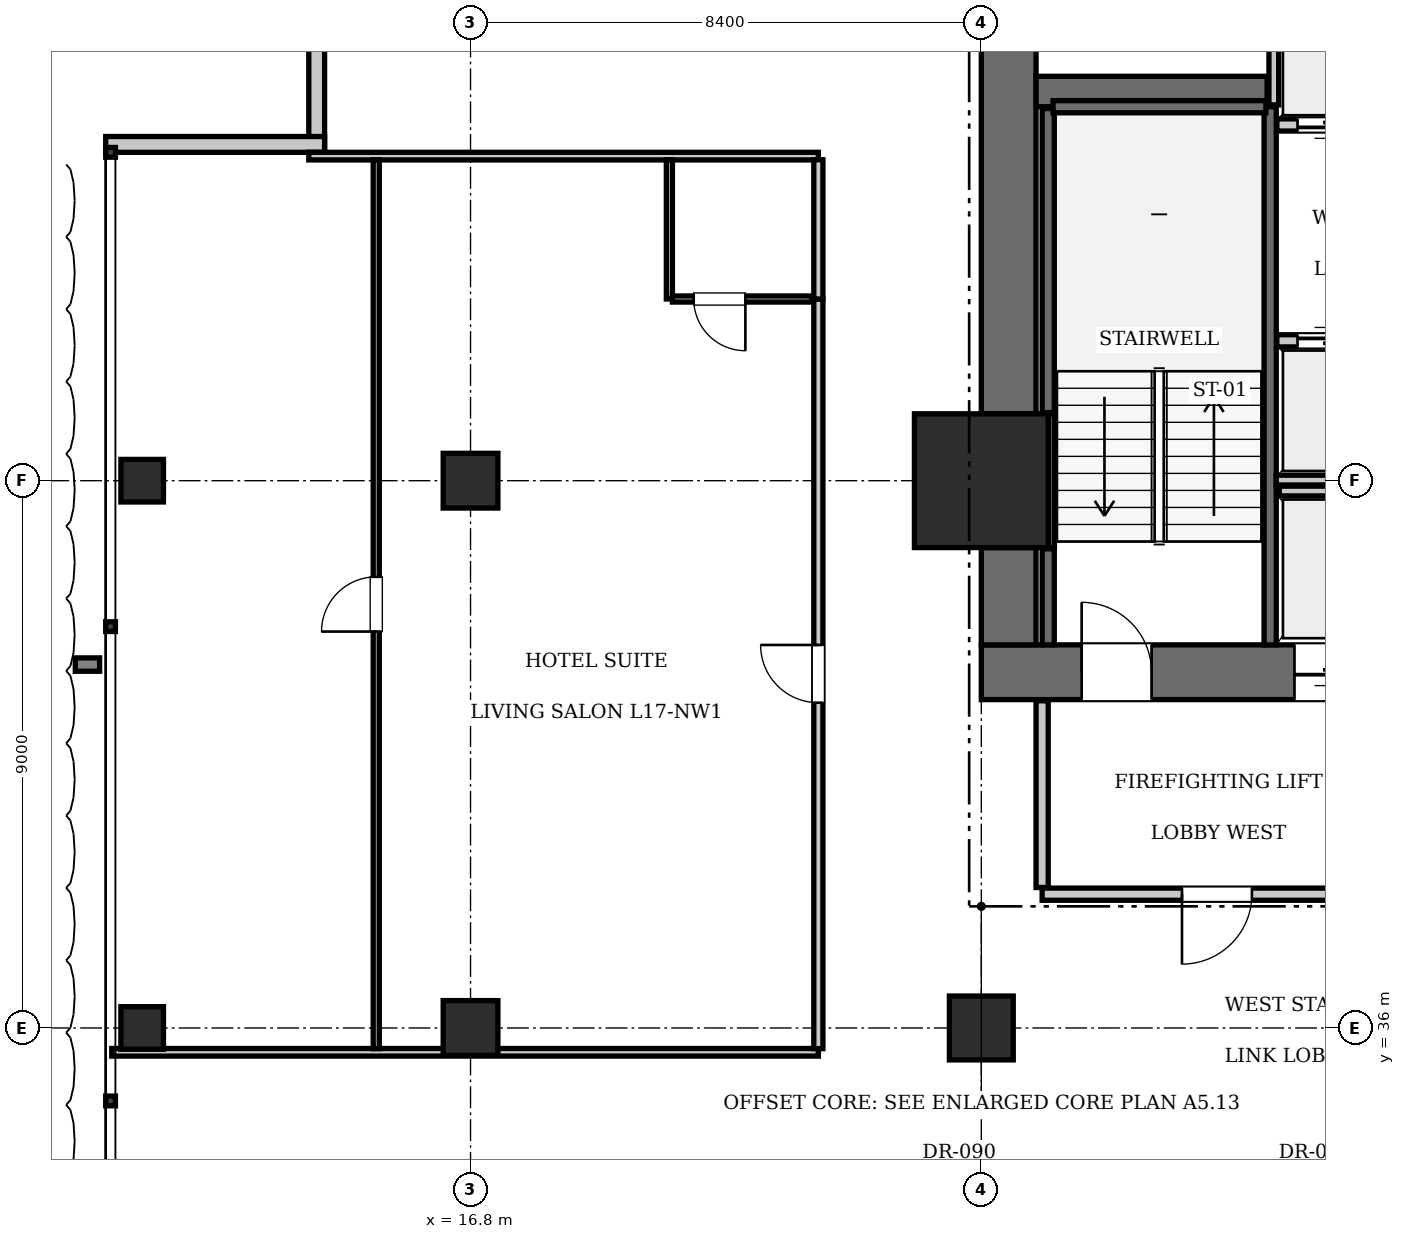
"""IFC4 building model, lengths in metres.
Left out: names, types, materials, properties, quantities, classifications, styles, units other than length and angle.
Written with IfcOpenShell. Run it as: python <this file> out.ifc"""

import sys

from ifc_helpers import new_model, si_unit, direction, frame, frame_2d, origin, origin_2d, place, context, subcontext, project, spatial, rectangle, i_section, extrude, element, fill, save


model = new_model("IFC4")
c1 = context("Model", 3, precision=1e-05, world=origin(), true_north=direction((0.0, 1.0)))
c2 = subcontext(c1, "Body", "Model", "MODEL_VIEW")
j1 = project(units=[si_unit("LENGTHUNIT", "METRE"), si_unit("PLANEANGLEUNIT", "RADIAN")], contexts=[c1])
p1 = place(None, origin())
s1 = spatial("IfcSite", under=j1, at=p1, CompositionType="ELEMENT")
p2 = place(p1, origin())
s2 = spatial("IfcBuilding", under=s1, at=p2, CompositionType="ELEMENT")
p3 = place(p2, frame((0.0, 0.0, 73.15)))
s3 = spatial("IfcBuildingStorey", under=s2, at=p3, CompositionType="ELEMENT", Elevation=73.15)
p4 = place(p3, frame((25.2, 45.0, 0.0), z_axis=(0.0, 0.0, 1.0), x_axis=(1.0, 0.0, 0.0)))
e1 = element("IfcColumn", 1, at=p4, inside=s3, PredefinedType="COLUMN", context=c2, shape_type="SweptSolid", body=[
    extrude(rectangle(XDim=2.2, YDim=2.2, at=origin_2d()), origin(), (0.0, 0.0, 1.0), 3.85),
])
p5 = place(p3, frame((25.2, 41.85, 0.0), z_axis=(0.0, 0.0, 1.0), x_axis=(1.0, 0.0, 0.0)))
e2 = element("IfcWall", 2, at=p5, inside=s3, PredefinedType="SHEAR", context=c2, shape_type="SweptSolid", body=[
    extrude(rectangle(XDim=6.8, YDim=0.9, at=frame_2d((3.4, 0.0))), origin(), (0.0, 0.0, 1.0), 3.85),
])
p6 = place(p5, frame((1.65, 0.0, 0.0)))
e3 = element("IfcOpeningElement", 3, at=p6, cuts=e2, PredefinedType="OPENING", context=c2, shape_type="SweptSolid", body=[
    extrude(rectangle(XDim=1.15, YDim=2.15, at=frame_2d((0.575, 1.075))), frame((0.0, 0.46, 0.0), z_axis=(0.0, -1.0, 0.0), x_axis=(1.0, 0.0, 0.0)), (0.0, 0.0, 1.0), 0.92),
])
p7 = place(p5, frame((5.15, 0.0, 0.0)))
e4 = element("IfcOpeningElement", 4, at=p7, cuts=e2, PredefinedType="OPENING", context=c2, shape_type="SweptSolid", body=[
    extrude(rectangle(XDim=1.1, YDim=2.2, at=frame_2d((0.55, 1.1))), frame((0.0, 0.46, 0.0), z_axis=(0.0, -1.0, 0.0), x_axis=(1.0, 0.0, 0.0)), (0.0, 0.0, 1.0), 0.92),
])
p8 = place(p3, frame((25.65, 42.3, 0.0), z_axis=(0.0, 0.0, 1.0), x_axis=(0.0, 1.0, 0.0)))
e5 = element("IfcWall", 5, at=p8, inside=s3, PredefinedType="SHEAR", context=c2, shape_type="SweptSolid", body=[
    extrude(rectangle(XDim=1.6, YDim=0.9, at=frame_2d((0.8, 0.0))), origin(), (0.0, 0.0, 1.0), 3.85),
])
p9 = place(p3, frame((25.65, 46.1, 0.0), z_axis=(0.0, 0.0, 1.0), x_axis=(0.0, 1.0, 0.0)))
e6 = element("IfcWall", 6, at=p9, inside=s3, PredefinedType="SHEAR", context=c2, shape_type="SweptSolid", body=[
    extrude(rectangle(XDim=7.0, YDim=0.9, at=frame_2d((3.5, 0.0))), origin(), (0.0, 0.0, 1.0), 3.85),
])
p10 = place(p3, frame((26.1, 51.4, 0.0), z_axis=(0.0, 0.0, 1.0), x_axis=(1.0, 0.0, 0.0)))
e7 = element("IfcWall", 7, at=p10, inside=s3, PredefinedType="SHEAR", context=c2, shape_type="SweptSolid", body=[
    extrude(rectangle(XDim=3.8, YDim=0.5, at=frame_2d((1.9, 0.0))), origin(), (0.0, 0.0, 1.0), 3.85),
])
p11 = place(p3, frame((25.2, 36.0, 0.0), z_axis=(0.0, 0.0, 1.0), x_axis=(1.0, 0.0, 0.0)))
e8 = element("IfcColumn", 8, at=p11, inside=s3, PredefinedType="COLUMN", context=c2, shape_type="SweptSolid", body=[
    extrude(rectangle(XDim=1.05, YDim=1.05, at=origin_2d()), origin(), (0.0, 0.0, 1.0), 3.85),
])
for number, where, z_axis, x_axis in (
    (9, (16.8, 36.0, 0.0), (0.0, 0.0, 1.0), (1.0, 0.0, 0.0)),
    (10, (16.8, 45.0, 0.0), (0.0, 0.0, 1.0), (1.0, 0.0, 0.0)),
):
    element("IfcColumn", number, at=place(p3, frame(where, z_axis=z_axis, x_axis=x_axis)), inside=s3, PredefinedType="COLUMN", context=c2, shape_type="SweptSolid", body=[
        extrude(rectangle(XDim=0.9, YDim=0.9, at=origin_2d()), origin(), (0.0, 0.0, 1.0), 3.85),
    ])
for number, where, z_axis, x_axis in (
    (11, (11.4, 36.0, 0.0), (0.0, 0.0, 1.0), (1.0, 0.0, 0.0)),
    (12, (11.4, 45.0, 0.0), (0.0, 0.0, 1.0), (1.0, 0.0, 0.0)),
):
    element("IfcColumn", number, at=place(p3, frame(where, z_axis=z_axis, x_axis=x_axis)), inside=s3, PredefinedType="COLUMN", context=c2, shape_type="SweptSolid", body=[
        extrude(i_section(OverallWidth=0.7, OverallDepth=0.7, WebThickness=0.028, FlangeThickness=0.044, at=origin_2d()), origin(), (0.0, 0.0, 1.0), 3.85),
    ])
p12 = place(p3, frame((29.95, 42.3, 0.0), z_axis=(0.0, 0.0, 1.0), x_axis=(0.0, 1.0, 0.0)))
e13 = element("IfcWall", 13, at=p12, inside=s3, PredefinedType="SOLIDWALL", context=c2, shape_type="SweptSolid", body=[
    extrude(rectangle(XDim=8.85, YDim=0.2, at=frame_2d((4.425, 0.0))), origin(), (0.0, 0.0, 1.0), 3.61),
])
p13 = place(p3, frame((26.3, 42.3, 0.0), z_axis=(0.0, 0.0, 1.0), x_axis=(0.0, 1.0, 0.0)))
e14 = element("IfcWall", 14, at=p13, inside=s3, PredefinedType="SOLIDWALL", context=c2, shape_type="SweptSolid", body=[
    extrude(rectangle(XDim=1.58, YDim=0.2, at=frame_2d((0.79, 0.0))), origin(), (0.0, 0.0, 1.0), 3.61),
])
p14 = place(p3, frame((26.3, 46.12, 0.0), z_axis=(0.0, 0.0, 1.0), x_axis=(0.0, 1.0, 0.0)))
e15 = element("IfcWall", 15, at=p14, inside=s3, PredefinedType="SOLIDWALL", context=c2, shape_type="SweptSolid", body=[
    extrude(rectangle(XDim=5.0, YDim=0.2, at=frame_2d((2.5, 0.0))), origin(), (0.0, 0.0, 1.0), 3.61),
])
p15 = place(p3, frame((26.38, 51.15, 0.0), z_axis=(0.0, 0.0, 1.0), x_axis=(1.0, 0.0, 0.0)))
e16 = element("IfcWall", 16, at=p15, inside=s3, PredefinedType="SOLIDWALL", context=c2, shape_type="SweptSolid", body=[
    extrude(rectangle(XDim=3.5, YDim=0.2, at=frame_2d((1.75, 0.0))), origin(), (0.0, 0.0, 1.0), 3.61),
])
p16 = place(p3, frame((26.352, 43.9, 0.0), z_axis=(0.0, 0.0, 1.0), x_axis=(0.0, 1.0, 0.0)))
e17 = element("IfcWall", 17, at=p16, inside=s3, PredefinedType="SOLIDWALL", context=c2, shape_type="SweptSolid", body=[
    extrude(rectangle(XDim=2.2, YDim=0.1, at=frame_2d((1.1, 0.0))), origin(), (0.0, 0.0, 1.0), 3.61),
])
p17 = place(p3, frame((30.06, 47.3, 0.0), z_axis=(0.0, 0.0, 1.0), x_axis=(1.0, 0.0, 0.0)))
e18 = element("IfcWall", 18, at=p17, inside=s3, PredefinedType="SOLIDWALL", context=c2, shape_type="SweptSolid", body=[
    extrude(rectangle(XDim=1.68, YDim=0.2, at=frame_2d((0.84, 0.0))), origin(), (0.0, 0.0, 1.0), 3.61),
])
p18 = place(p17, frame((0.34, 0.0, 0.0)))
e19 = element("IfcOpeningElement", 19, at=p18, cuts=e18, PredefinedType="OPENING", context=c2, shape_type="SweptSolid", body=[
    extrude(rectangle(XDim=1.0, YDim=2.15, at=frame_2d((0.5, 1.075))), frame((0.0, 0.11, 0.0), z_axis=(0.0, -1.0, 0.0), x_axis=(1.0, 0.0, 0.0)), (0.0, 0.0, 1.0), 0.22),
])
p19 = place(p3, frame((30.06, 50.85, 0.0), z_axis=(0.0, 0.0, 1.0), x_axis=(1.0, 0.0, 0.0)))
e20 = element("IfcWall", 20, at=p19, inside=s3, PredefinedType="SOLIDWALL", context=c2, shape_type="SweptSolid", body=[
    extrude(rectangle(XDim=1.68, YDim=0.2, at=frame_2d((0.84, 0.0))), origin(), (0.0, 0.0, 1.0), 3.61),
])
p20 = place(p19, frame((0.34, 0.0, 0.0)))
e21 = element("IfcOpeningElement", 21, at=p20, cuts=e20, PredefinedType="OPENING", context=c2, shape_type="SweptSolid", body=[
    extrude(rectangle(XDim=1.0, YDim=2.15, at=frame_2d((0.5, 1.075))), frame((0.0, 0.11, 0.0), z_axis=(0.0, -1.0, 0.0), x_axis=(1.0, 0.0, 0.0)), (0.0, 0.0, 1.0), 0.22),
])
p21 = place(p3, frame((30.1, 44.83, 0.0), z_axis=(0.0, 0.0, 1.0), x_axis=(1.0, 0.0, 0.0)))
e22 = element("IfcWall", 22, at=p21, inside=s3, PredefinedType="SOLIDWALL", context=c2, shape_type="SweptSolid", body=[
    extrude(rectangle(XDim=1.6, YDim=0.16, at=frame_2d((0.8, 0.0))), origin(), (0.0, 0.0, 1.0), 3.61),
])
p22 = place(p3, frame((30.05, 45.01, 0.0), z_axis=(0.0, 0.0, 1.0), x_axis=(1.0, 0.0, 0.0)))
e23 = element("IfcWall", 23, at=p22, inside=s3, PredefinedType="SOLIDWALL", context=c2, shape_type="SweptSolid", body=[
    extrude(rectangle(XDim=3.45, YDim=0.16, at=frame_2d((1.725, 0.0))), origin(), (0.0, 0.0, 1.0), 3.61),
])
p23 = place(p3, frame((30.01, 51.18, 0.0), z_axis=(0.0, 0.0, 1.0), x_axis=(0.0, 1.0, 0.0)))
e24 = element("IfcWall", 24, at=p23, inside=s3, PredefinedType="SOLIDWALL", context=c2, shape_type="SweptSolid", body=[
    extrude(rectangle(XDim=1.92, YDim=0.16, at=frame_2d((0.96, 0.0))), origin(), (0.0, 0.0, 1.0), 3.61),
])
p24 = place(p3, frame((14.27, 50.4, 0.0), z_axis=(0.0, 0.0, 1.0), x_axis=(0.0, 1.0, 0.0)))
e25 = element("IfcWall", 25, at=p24, inside=s3, PredefinedType="SOLIDWALL", context=c2, shape_type="SweptSolid", body=[
    extrude(rectangle(XDim=3.6, YDim=0.26, at=frame_2d((1.8, 0.0))), origin(), (0.0, 0.0, 1.0), 3.61),
])
p25 = place(p3, frame((10.8, 50.53, 0.0), z_axis=(0.0, 0.0, 1.0), x_axis=(1.0, 0.0, 0.0)))
e26 = element("IfcWall", 26, at=p25, inside=s3, PredefinedType="SOLIDWALL", context=c2, shape_type="SweptSolid", body=[
    extrude(rectangle(XDim=3.6, YDim=0.26, at=frame_2d((1.8, 0.0))), origin(), (0.0, 0.0, 1.0), 3.61),
])
p26 = place(p3, frame((26.2, 38.2, 0.0), z_axis=(0.0, 0.0, 1.0), x_axis=(1.0, 0.0, 0.0)))
e27 = element("IfcWall", 27, at=p26, inside=s3, PredefinedType="PARTITIONING", context=c2, shape_type="SweptSolid", body=[
    extrude(rectangle(XDim=5.8, YDim=0.2, at=frame_2d((2.9, 0.0))), origin(), (0.0, 0.0, 1.0), 3.61),
])
p27 = place(p26, frame((2.3, 0.0, 0.0)))
e28 = element("IfcOpeningElement", 28, at=p27, cuts=e27, PredefinedType="OPENING", context=c2, shape_type="SweptSolid", body=[
    extrude(rectangle(XDim=1.15, YDim=2.15, at=frame_2d((0.575, 1.075))), frame((0.0, 0.11, 0.0), z_axis=(0.0, -1.0, 0.0), x_axis=(1.0, 0.0, 0.0)), (0.0, 0.0, 1.0), 0.22),
])
p28 = place(p3, frame((26.2, 38.31, 0.0), z_axis=(0.0, 0.0, 1.0), x_axis=(0.0, 1.0, 0.0)))
e29 = element("IfcWall", 29, at=p28, inside=s3, PredefinedType="PARTITIONING", context=c2, shape_type="SweptSolid", body=[
    extrude(rectangle(XDim=3.07, YDim=0.2, at=frame_2d((1.535, 0.0))), origin(), (0.0, 0.0, 1.0), 3.61),
])
p29 = place(p3, frame((10.9, 35.6, 0.0), z_axis=(0.0, 0.0, 1.0), x_axis=(1.0, 0.0, 0.0)))
e30 = element("IfcWall", 30, at=p29, inside=s3, PredefinedType="PARTITIONING", context=c2, shape_type="SweptSolid", body=[
    extrude(rectangle(XDim=11.62, YDim=0.125, at=frame_2d((5.81, 0.0))), origin(), (0.0, 0.0, 1.0), 3.61),
])
p30 = place(p3, frame((14.14, 50.337, 0.0), z_axis=(0.0, 0.0, 1.0), x_axis=(1.0, 0.0, 0.0)))
e31 = element("IfcWall", 31, at=p30, inside=s3, PredefinedType="PARTITIONING", context=c2, shape_type="SweptSolid", body=[
    extrude(rectangle(XDim=8.38, YDim=0.125, at=frame_2d((4.19, 0.0))), origin(), (0.0, 0.0, 1.0), 3.61),
])
p31 = place(p3, frame((22.52, 35.66, 0.0), z_axis=(0.0, 0.0, 1.0), x_axis=(0.0, 1.0, 0.0)))
e32 = element("IfcWall", 32, at=p31, inside=s3, PredefinedType="PARTITIONING", context=c2, shape_type="SweptSolid", body=[
    extrude(rectangle(XDim=12.328, YDim=0.15, at=frame_2d((6.164, 0.0))), origin(), (0.0, 0.0, 1.0), 3.61),
])
p32 = place(p31, frame((5.689, 0.0, 0.0)))
e33 = element("IfcOpeningElement", 33, at=p32, cuts=e32, PredefinedType="OPENING", context=c2, shape_type="SweptSolid", body=[
    extrude(rectangle(XDim=0.95, YDim=2.15, at=frame_2d((0.475, 1.075))), frame((0.0, 0.085, 0.0), z_axis=(0.0, -1.0, 0.0), x_axis=(1.0, 0.0, 0.0)), (0.0, 0.0, 1.0), 0.17),
])
p33 = place(p3, frame((22.52, 47.988, 0.0), z_axis=(0.0, 0.0, 1.0), x_axis=(0.0, 1.0, 0.0)))
e34 = element("IfcWall", 34, at=p33, inside=s3, PredefinedType="PARTITIONING", context=c2, shape_type="SweptSolid", body=[
    extrude(rectangle(XDim=2.29, YDim=0.15, at=frame_2d((1.145, 0.0))), origin(), (0.0, 0.0, 1.0), 3.61),
])
p34 = place(p3, frame((20.07, 47.988, 0.0), z_axis=(0.0, 0.0, 1.0), x_axis=(0.0, 1.0, 0.0)))
e35 = element("IfcWall", 35, at=p34, inside=s3, PredefinedType="PARTITIONING", context=c2, shape_type="SweptSolid", body=[
    extrude(rectangle(XDim=2.29, YDim=0.1, at=frame_2d((1.145, 0.0))), origin(), (0.0, 0.0, 1.0), 3.61),
])
p35 = place(p3, frame((20.12, 47.988, 0.0), z_axis=(0.0, 0.0, 1.0), x_axis=(1.0, 0.0, 0.0)))
e36 = element("IfcWall", 36, at=p35, inside=s3, PredefinedType="PARTITIONING", context=c2, shape_type="SweptSolid", body=[
    extrude(rectangle(XDim=2.3, YDim=0.1, at=frame_2d((1.15, 0.0))), origin(), (0.0, 0.0, 1.0), 3.61),
])
p36 = place(p35, frame((0.35, 0.0, 0.0)))
e37 = element("IfcOpeningElement", 37, at=p36, cuts=e36, PredefinedType="OPENING", context=c2, shape_type="SweptSolid", body=[
    extrude(rectangle(XDim=0.85, YDim=2.1, at=frame_2d((0.425, 1.05))), frame((0.0, 0.06, 0.0), z_axis=(0.0, -1.0, 0.0), x_axis=(1.0, 0.0, 0.0)), (0.0, 0.0, 1.0), 0.12),
])
p37 = place(p3, frame((15.25, 35.66, 0.0), z_axis=(0.0, 0.0, 1.0), x_axis=(0.0, 1.0, 0.0)))
e38 = element("IfcWall", 38, at=p37, inside=s3, PredefinedType="PARTITIONING", context=c2, shape_type="SweptSolid", body=[
    extrude(rectangle(XDim=14.618, YDim=0.1, at=frame_2d((7.309, 0.0))), origin(), (0.0, 0.0, 1.0), 3.61),
])
p38 = place(p37, frame((6.859, 0.0, 0.0)))
e39 = element("IfcOpeningElement", 39, at=p38, cuts=e38, PredefinedType="OPENING", context=c2, shape_type="SweptSolid", body=[
    extrude(rectangle(XDim=0.9, YDim=2.1, at=frame_2d((0.45, 1.05))), frame((0.0, 0.06, 0.0), z_axis=(0.0, -1.0, 0.0), x_axis=(1.0, 0.0, 0.0)), (0.0, 0.0, 1.0), 0.12),
])
p39 = place(p6, origin())
e40 = element("IfcDoor", 40, at=p39, inside=s3, OperationType="SINGLE_SWING_LEFT", PredefinedType="DOOR", context=c2, shape_type="SweptSolid", body=[
    extrude(rectangle(XDim=1.15, YDim=2.15, at=frame_2d((0.575, 1.075))), frame((0.0, 0.025, 0.0), z_axis=(0.0, -1.0, 0.0), x_axis=(1.0, 0.0, 0.0)), (0.0, 0.0, 1.0), 0.05),
])
fill(e3, e40)
p40 = place(p18, origin())
e41 = element("IfcDoor", 41, at=p40, inside=s3, OperationType="SLIDING_TO_LEFT", PredefinedType="DOOR", context=c2, shape_type="SweptSolid", body=[
    extrude(rectangle(XDim=1.0, YDim=2.15, at=frame_2d((0.5, 1.075))), frame((0.0, 0.025, 0.0), z_axis=(0.0, -1.0, 0.0), x_axis=(1.0, 0.0, 0.0)), (0.0, 0.0, 1.0), 0.05),
])
fill(e19, e41)
p41 = place(p20, frame((1.0, 0.0, 0.0), z_axis=(0.0, 0.0, 1.0), x_axis=(-1.0, 0.0, 0.0)))
e42 = element("IfcDoor", 42, at=p41, inside=s3, OperationType="SLIDING_TO_LEFT", PredefinedType="DOOR", context=c2, shape_type="SweptSolid", body=[
    extrude(rectangle(XDim=1.0, YDim=2.15, at=frame_2d((0.5, 1.075))), frame((0.0, 0.025, 0.0), z_axis=(0.0, -1.0, 0.0), x_axis=(1.0, 0.0, 0.0)), (0.0, 0.0, 1.0), 0.05),
])
fill(e21, e42)
p42 = place(p7, frame((1.1, 0.0, 0.0), z_axis=(0.0, 0.0, 1.0), x_axis=(-1.0, 0.0, 0.0)))
e43 = element("IfcDoor", 43, at=p42, inside=s3, OperationType="SLIDING_TO_LEFT", PredefinedType="DOOR", context=c2, shape_type="SweptSolid", body=[
    extrude(rectangle(XDim=1.1, YDim=2.2, at=frame_2d((0.55, 1.1))), frame((0.0, 0.025, 0.0), z_axis=(0.0, -1.0, 0.0), x_axis=(1.0, 0.0, 0.0)), (0.0, 0.0, 1.0), 0.05),
])
fill(e4, e43)
p43 = place(p27, frame((1.15, 0.0, 0.0), z_axis=(0.0, 0.0, 1.0), x_axis=(-1.0, 0.0, 0.0)))
e44 = element("IfcDoor", 44, at=p43, inside=s3, OperationType="SINGLE_SWING_RIGHT", PredefinedType="DOOR", context=c2, shape_type="SweptSolid", body=[
    extrude(rectangle(XDim=1.15, YDim=2.15, at=frame_2d((0.575, 1.075))), frame((0.0, 0.025, 0.0), z_axis=(0.0, -1.0, 0.0), x_axis=(1.0, 0.0, 0.0)), (0.0, 0.0, 1.0), 0.05),
])
fill(e28, e44)
p44 = place(p36, frame((0.85, 0.0, 0.0), z_axis=(0.0, 0.0, 1.0), x_axis=(-1.0, 0.0, 0.0)))
e45 = element("IfcDoor", 45, at=p44, inside=s3, OperationType="SINGLE_SWING_LEFT", PredefinedType="DOOR", context=c2, shape_type="SweptSolid", body=[
    extrude(rectangle(XDim=0.85, YDim=2.1, at=frame_2d((0.425, 1.05))), frame((0.0, 0.025, 0.0), z_axis=(0.0, -1.0, 0.0), x_axis=(1.0, 0.0, 0.0)), (0.0, 0.0, 1.0), 0.05),
])
fill(e37, e45)
p45 = place(p32, origin())
e46 = element("IfcDoor", 46, at=p45, inside=s3, OperationType="SINGLE_SWING_RIGHT", PredefinedType="DOOR", context=c2, shape_type="SweptSolid", body=[
    extrude(rectangle(XDim=0.95, YDim=2.15, at=frame_2d((0.475, 1.075))), frame((0.0, 0.025, 0.0), z_axis=(0.0, -1.0, 0.0), x_axis=(1.0, 0.0, 0.0)), (0.0, 0.0, 1.0), 0.05),
])
fill(e33, e46)
p46 = place(p38, origin())
e47 = element("IfcDoor", 47, at=p46, inside=s3, OperationType="SINGLE_SWING_LEFT", PredefinedType="DOOR", context=c2, shape_type="SweptSolid", body=[
    extrude(rectangle(XDim=0.9, YDim=2.1, at=frame_2d((0.45, 1.05))), frame((0.0, 0.025, 0.0), z_axis=(0.0, -1.0, 0.0), x_axis=(1.0, 0.0, 0.0)), (0.0, 0.0, 1.0), 0.05),
])
fill(e39, e47)
save(model, sys.argv[1])
